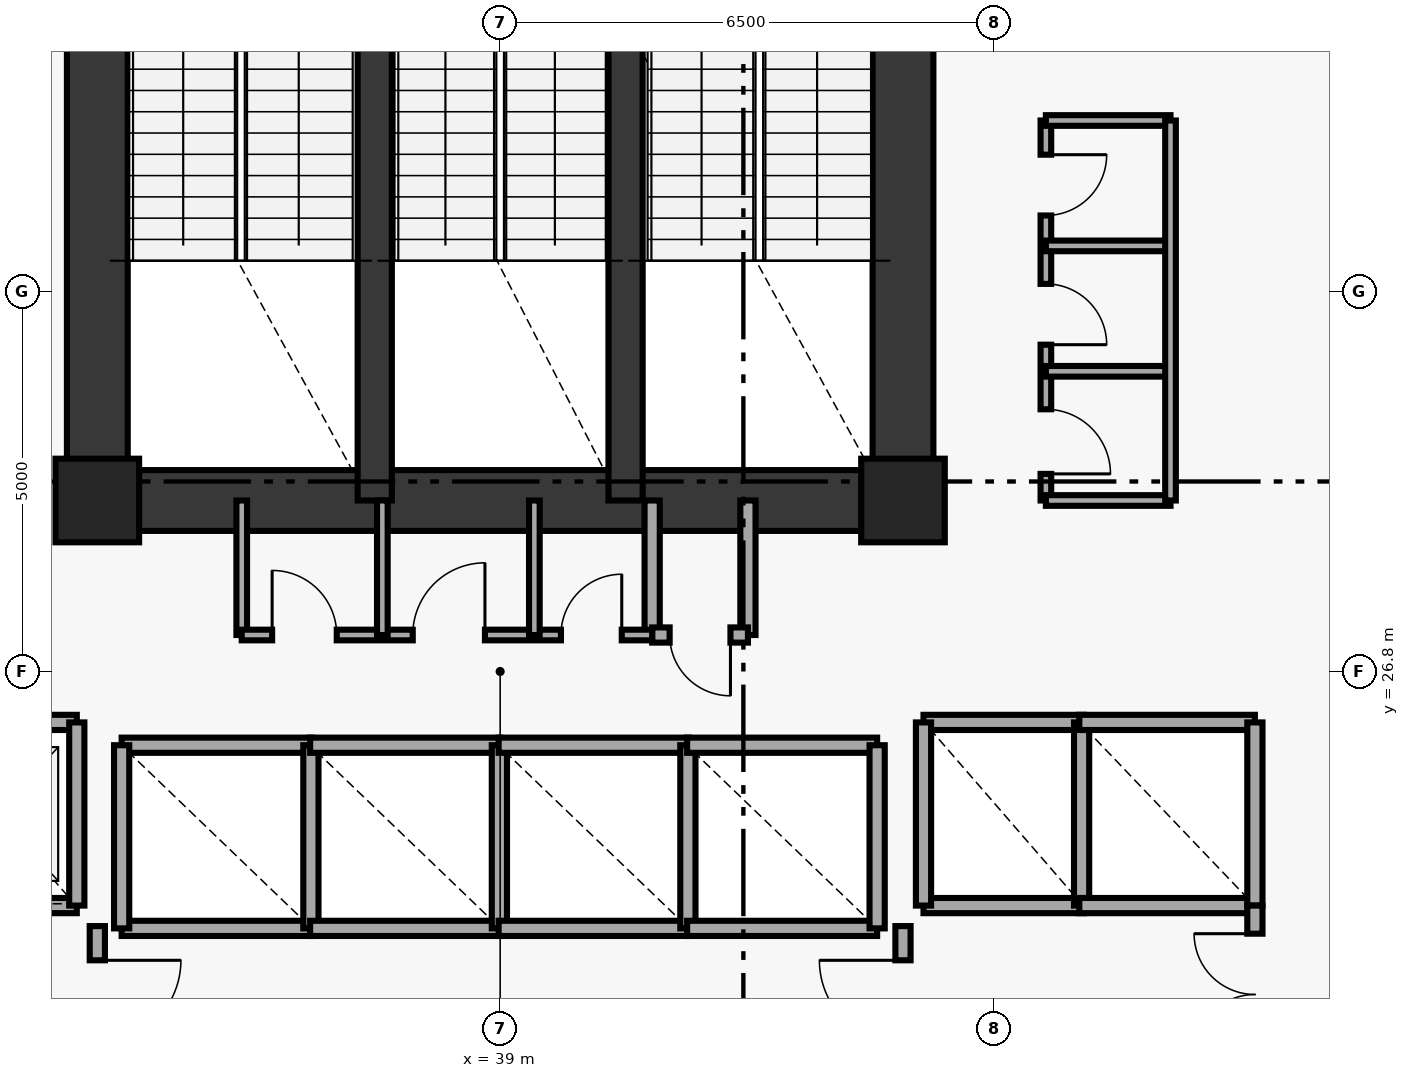
"""IFC4 building model, lengths in metres.
Left out: names, types, materials, properties, quantities, classifications, styles, units other than length and angle.
Written with IfcOpenShell. Run it as: python <this file> out.ifc"""

import sys

from ifc_helpers import new_model, si_unit, direction, frame, frame_2d, origin, origin_2d, place, context, subcontext, project, spatial, rectangle, extrude, element, fill, save


model = new_model("IFC4")
c1 = context("Model", 3, precision=1e-05, world=origin(), true_north=direction((0.0, 1.0)))
c2 = subcontext(c1, "Body", "Model", "MODEL_VIEW")
j1 = project(units=[si_unit("LENGTHUNIT", "METRE"), si_unit("PLANEANGLEUNIT", "RADIAN")], contexts=[c1])
p1 = place(None, origin())
s1 = spatial("IfcSite", under=j1, at=p1, CompositionType="ELEMENT")
p2 = place(p1, origin())
s2 = spatial("IfcBuilding", under=s1, at=p2, CompositionType="ELEMENT")
p3 = place(p2, frame((0.0, 0.0, 21.0)))
s3 = spatial("IfcBuildingStorey", under=s2, at=p3, CompositionType="ELEMENT", Elevation=21.0)
for number, where, z_axis, x_axis in (
    (1, (44.3, 29.05, 0.0), (0.0, 0.0, 1.0), (1.0, 0.0, 0.0)),
    (2, (33.7, 29.05, 0.0), (0.0, 0.0, 1.0), (1.0, 0.0, 0.0)),
):
    element("IfcColumn", number, at=place(p3, frame(where, z_axis=z_axis, x_axis=x_axis)), inside=s3, PredefinedType="PILASTER", context=c2, shape_type="SweptSolid", body=[
        extrude(rectangle(XDim=1.1, YDim=1.1, at=origin_2d()), origin(), (0.0, 0.0, 1.0), 3.79),
    ])
for number, where, z_axis, x_axis in (
    (3, (33.7, 29.05, 0.0), (0.0, 0.0, 1.0), (0.0, 1.0, 0.0)),
    (4, (44.3, 29.05, 0.0), (0.0, 0.0, 1.0), (0.0, 1.0, 0.0)),
):
    element("IfcWall", number, at=place(p3, frame(where, z_axis=z_axis, x_axis=x_axis)), inside=s3, PredefinedType="SHEAR", context=c2, shape_type="SweptSolid", body=[
        extrude(rectangle(XDim=8.35, YDim=0.8, at=frame_2d((4.175, 0.0))), origin(), (0.0, 0.0, 1.0), 3.79),
    ])
p4 = place(p3, frame((33.7, 29.05, 0.0), z_axis=(0.0, 0.0, 1.0), x_axis=(1.0, 0.0, 0.0)))
e5 = element("IfcWall", 5, at=p4, inside=s3, PredefinedType="SHEAR", context=c2, shape_type="SweptSolid", body=[
    extrude(rectangle(XDim=10.6, YDim=0.8, at=frame_2d((5.3, 0.0))), origin(), (0.0, 0.0, 1.0), 3.79),
])
for number, where, z_axis, x_axis in (
    (6, (37.35, 29.05, 0.0), (0.0, 0.0, 1.0), (0.0, 1.0, 0.0)),
    (7, (40.65, 29.05, 0.0), (0.0, 0.0, 1.0), (0.0, 1.0, 0.0)),
):
    element("IfcWall", number, at=place(p3, frame(where, z_axis=z_axis, x_axis=x_axis)), inside=s3, PredefinedType="SHEAR", context=c2, shape_type="SweptSolid", body=[
        extrude(rectangle(XDim=8.35, YDim=0.45, at=frame_2d((4.175, 0.0))), origin(), (0.0, 0.0, 1.0), 3.79),
    ])
p5 = place(p3, frame((35.6, 27.28, 0.0), z_axis=(0.0, 0.0, 1.0), x_axis=(0.0, 1.0, 0.0)))
e8 = element("IfcWall", 8, at=p5, inside=s3, PredefinedType="PARTITIONING", context=c2, shape_type="SweptSolid", body=[
    extrude(rectangle(XDim=1.77, YDim=0.14, at=frame_2d((0.885, 0.0))), origin(), (0.0, 0.0, 1.0), 3.79),
])
for number, where, z_axis, x_axis in (
    (9, (41.0, 27.28, 0.0), (0.0, 0.0, 1.0), (0.0, 1.0, 0.0)),
    (10, (42.26, 27.28, 0.0), (0.0, 0.0, 1.0), (0.0, 1.0, 0.0)),
):
    element("IfcWall", number, at=place(p3, frame(where, z_axis=z_axis, x_axis=x_axis)), inside=s3, PredefinedType="SOLIDWALL", context=c2, shape_type="SweptSolid", body=[
        extrude(rectangle(XDim=1.77, YDim=0.2, at=frame_2d((0.885, 0.0))), origin(), (0.0, 0.0, 1.0), 3.79),
    ])
p6 = place(p3, frame((41.0, 27.28, 0.0), z_axis=(0.0, 0.0, 1.0), x_axis=(1.0, 0.0, 0.0)))
e11 = element("IfcWall", 11, at=p6, inside=s3, PredefinedType="SOLIDWALL", context=c2, shape_type="SweptSolid", body=[
    extrude(rectangle(XDim=1.26, YDim=0.2, at=frame_2d((0.63, 0.0))), origin(), (0.0, 0.0, 1.0), 3.79),
])
p7 = place(p6, frame((0.23, 0.0, 0.0)))
e12 = element("IfcOpeningElement", 12, at=p7, cuts=e11, PredefinedType="OPENING", context=c2, shape_type="SweptSolid", body=[
    extrude(rectangle(XDim=0.8, YDim=2.05, at=frame_2d((0.4, 1.025))), frame((0.0, 0.11, 0.0), z_axis=(0.0, -1.0, 0.0), x_axis=(1.0, 0.0, 0.0)), (0.0, 0.0, 1.0), 0.22),
])
p8 = place(p3, frame((31.32, 23.72, 0.0), z_axis=(0.0, 0.0, 1.0), x_axis=(1.0, 0.0, 0.0)))
e13 = element("IfcWall", 13, at=p8, inside=s3, PredefinedType="SOLIDWALL", context=c2, shape_type="SweptSolid", body=[
    extrude(rectangle(XDim=2.11, YDim=0.2, at=frame_2d((1.055, 0.0))), origin(), (0.0, 0.0, 1.0), 3.79),
])
p9 = place(p8, frame((0.505, 0.0, 0.0)))
e14 = element("IfcOpeningElement", 14, at=p9, cuts=e13, PredefinedType="OPENING", context=c2, shape_type="SweptSolid", body=[
    extrude(rectangle(XDim=1.1, YDim=2.15, at=frame_2d((0.55, 1.075))), frame((0.0, 0.11, 0.0), z_axis=(0.0, -1.0, 0.0), x_axis=(1.0, 0.0, 0.0)), (0.0, 0.0, 1.0), 0.22),
])
p10 = place(p3, frame((31.32, 26.13, 0.0), z_axis=(0.0, 0.0, 1.0), x_axis=(1.0, 0.0, 0.0)))
e15 = element("IfcWall", 15, at=p10, inside=s3, PredefinedType="SOLIDWALL", context=c2, shape_type="SweptSolid", body=[
    extrude(rectangle(XDim=2.11, YDim=0.2, at=frame_2d((1.055, 0.0))), origin(), (0.0, 0.0, 1.0), 3.79),
])
p11 = place(p3, frame((33.43, 23.72, 0.0), z_axis=(0.0, 0.0, 1.0), x_axis=(0.0, 1.0, 0.0)))
e16 = element("IfcWall", 16, at=p11, inside=s3, PredefinedType="SOLIDWALL", context=c2, shape_type="SweptSolid", body=[
    extrude(rectangle(XDim=2.41, YDim=0.2, at=frame_2d((1.205, 0.0))), origin(), (0.0, 0.0, 1.0), 3.79),
])
for number, where, z_axis, x_axis in (
    (17, (44.57, 23.72, 0.0), (0.0, 0.0, 1.0), (1.0, 0.0, 0.0)),
    (18, (44.57, 26.13, 0.0), (0.0, 0.0, 1.0), (1.0, 0.0, 0.0)),
):
    element("IfcWall", number, at=place(p3, frame(where, z_axis=z_axis, x_axis=x_axis)), inside=s3, PredefinedType="SOLIDWALL", context=c2, shape_type="SweptSolid", body=[
        extrude(rectangle(XDim=2.11, YDim=0.2, at=frame_2d((1.055, 0.0))), origin(), (0.0, 0.0, 1.0), 3.79),
    ])
for number, where, z_axis, x_axis in (
    (19, (44.57, 23.72, 0.0), (0.0, 0.0, 1.0), (0.0, 1.0, 0.0)),
    (20, (46.65, 23.72, 0.0), (0.0, 0.0, 1.0), (0.0, 1.0, 0.0)),
):
    element("IfcWall", number, at=place(p3, frame(where, z_axis=z_axis, x_axis=x_axis)), inside=s3, PredefinedType="SOLIDWALL", context=c2, shape_type="SweptSolid", body=[
        extrude(rectangle(XDim=2.41, YDim=0.2, at=frame_2d((1.205, 0.0))), origin(), (0.0, 0.0, 1.0), 3.79),
    ])
for number, where, z_axis, x_axis in (
    (21, (46.62, 23.72, 0.0), (0.0, 0.0, 1.0), (1.0, 0.0, 0.0)),
    (22, (46.62, 26.13, 0.0), (0.0, 0.0, 1.0), (1.0, 0.0, 0.0)),
):
    element("IfcWall", number, at=place(p3, frame(where, z_axis=z_axis, x_axis=x_axis)), inside=s3, PredefinedType="SOLIDWALL", context=c2, shape_type="SweptSolid", body=[
        extrude(rectangle(XDim=2.31, YDim=0.2, at=frame_2d((1.155, 0.0))), origin(), (0.0, 0.0, 1.0), 3.79),
    ])
p12 = place(p3, frame((48.93, 23.72, 0.0), z_axis=(0.0, 0.0, 1.0), x_axis=(0.0, 1.0, 0.0)))
e23 = element("IfcWall", 23, at=p12, inside=s3, PredefinedType="SOLIDWALL", context=c2, shape_type="SweptSolid", body=[
    extrude(rectangle(XDim=2.41, YDim=0.2, at=frame_2d((1.205, 0.0))), origin(), (0.0, 0.0, 1.0), 3.79),
])
for number, where, z_axis, x_axis in (
    (24, (34.02, 23.42, 0.0), (0.0, 0.0, 1.0), (1.0, 0.0, 0.0)),
    (25, (34.02, 25.83, 0.0), (0.0, 0.0, 1.0), (1.0, 0.0, 0.0)),
):
    element("IfcWall", number, at=place(p3, frame(where, z_axis=z_axis, x_axis=x_axis)), inside=s3, PredefinedType="SOLIDWALL", context=c2, shape_type="SweptSolid", body=[
        extrude(rectangle(XDim=2.5, YDim=0.2, at=frame_2d((1.25, 0.0))), origin(), (0.0, 0.0, 1.0), 3.79),
    ])
for number, where, z_axis, x_axis in (
    (26, (34.02, 23.42, 0.0), (0.0, 0.0, 1.0), (0.0, 1.0, 0.0)),
    (27, (36.51, 23.42, 0.0), (0.0, 0.0, 1.0), (0.0, 1.0, 0.0)),
):
    element("IfcWall", number, at=place(p3, frame(where, z_axis=z_axis, x_axis=x_axis)), inside=s3, PredefinedType="SOLIDWALL", context=c2, shape_type="SweptSolid", body=[
        extrude(rectangle(XDim=2.41, YDim=0.2, at=frame_2d((1.205, 0.0))), origin(), (0.0, 0.0, 1.0), 3.79),
    ])
for number, where, z_axis, x_axis in (
    (28, (36.5, 23.42, 0.0), (0.0, 0.0, 1.0), (1.0, 0.0, 0.0)),
    (29, (36.5, 25.83, 0.0), (0.0, 0.0, 1.0), (1.0, 0.0, 0.0)),
):
    element("IfcWall", number, at=place(p3, frame(where, z_axis=z_axis, x_axis=x_axis)), inside=s3, PredefinedType="SOLIDWALL", context=c2, shape_type="SweptSolid", body=[
        extrude(rectangle(XDim=2.5, YDim=0.2, at=frame_2d((1.25, 0.0))), origin(), (0.0, 0.0, 1.0), 3.79),
    ])
p13 = place(p3, frame((38.99, 23.42, 0.0), z_axis=(0.0, 0.0, 1.0), x_axis=(0.0, 1.0, 0.0)))
e30 = element("IfcWall", 30, at=p13, inside=s3, PredefinedType="SOLIDWALL", context=c2, shape_type="SweptSolid", body=[
    extrude(rectangle(XDim=2.41, YDim=0.2, at=frame_2d((1.205, 0.0))), origin(), (0.0, 0.0, 1.0), 3.79),
])
for number, where, z_axis, x_axis in (
    (31, (38.98, 23.42, 0.0), (0.0, 0.0, 1.0), (1.0, 0.0, 0.0)),
    (32, (38.98, 25.83, 0.0), (0.0, 0.0, 1.0), (1.0, 0.0, 0.0)),
):
    element("IfcWall", number, at=place(p3, frame(where, z_axis=z_axis, x_axis=x_axis)), inside=s3, PredefinedType="SOLIDWALL", context=c2, shape_type="SweptSolid", body=[
        extrude(rectangle(XDim=2.5, YDim=0.2, at=frame_2d((1.25, 0.0))), origin(), (0.0, 0.0, 1.0), 3.79),
    ])
p14 = place(p3, frame((41.47, 23.42, 0.0), z_axis=(0.0, 0.0, 1.0), x_axis=(0.0, 1.0, 0.0)))
e33 = element("IfcWall", 33, at=p14, inside=s3, PredefinedType="SOLIDWALL", context=c2, shape_type="SweptSolid", body=[
    extrude(rectangle(XDim=2.41, YDim=0.2, at=frame_2d((1.205, 0.0))), origin(), (0.0, 0.0, 1.0), 3.79),
])
for number, where, z_axis, x_axis in (
    (34, (41.46, 23.42, 0.0), (0.0, 0.0, 1.0), (1.0, 0.0, 0.0)),
    (35, (41.46, 25.83, 0.0), (0.0, 0.0, 1.0), (1.0, 0.0, 0.0)),
):
    element("IfcWall", number, at=place(p3, frame(where, z_axis=z_axis, x_axis=x_axis)), inside=s3, PredefinedType="SOLIDWALL", context=c2, shape_type="SweptSolid", body=[
        extrude(rectangle(XDim=2.5, YDim=0.2, at=frame_2d((1.25, 0.0))), origin(), (0.0, 0.0, 1.0), 3.79),
    ])
p15 = place(p3, frame((43.96, 23.42, 0.0), z_axis=(0.0, 0.0, 1.0), x_axis=(0.0, 1.0, 0.0)))
e36 = element("IfcWall", 36, at=p15, inside=s3, PredefinedType="SOLIDWALL", context=c2, shape_type="SweptSolid", body=[
    extrude(rectangle(XDim=2.41, YDim=0.2, at=frame_2d((1.205, 0.0))), origin(), (0.0, 0.0, 1.0), 3.79),
])
p16 = place(p3, frame((48.93, 21.38, 0.0), z_axis=(0.0, 0.0, 1.0), x_axis=(0.0, 1.0, 0.0)))
e37 = element("IfcWall", 37, at=p16, inside=s3, PredefinedType="SOLIDWALL", context=c2, shape_type="SweptSolid", body=[
    extrude(rectangle(XDim=2.34, YDim=0.2, at=frame_2d((1.17, 0.0))), origin(), (0.0, 0.0, 1.0), 3.79),
])
p17 = place(p16, frame((0.37, 0.0, 0.0)))
e38 = element("IfcOpeningElement", 38, at=p17, cuts=e37, PredefinedType="OPENING", context=c2, shape_type="SweptSolid", body=[
    extrude(rectangle(XDim=1.6, YDim=2.2, at=frame_2d((0.8, 1.1))), frame((0.0, 0.11, 0.0), z_axis=(0.0, -1.0, 0.0), x_axis=(1.0, 0.0, 0.0)), (0.0, 0.0, 1.0), 0.22),
])
p18 = place(p3, frame((33.7, 21.35, 0.0), z_axis=(0.0, 0.0, 1.0), x_axis=(0.0, 1.0, 0.0)))
e39 = element("IfcWall", 39, at=p18, inside=s3, PredefinedType="SOLIDWALL", context=c2, shape_type="SweptSolid", body=[
    extrude(rectangle(XDim=2.1, YDim=0.2, at=frame_2d((1.05, 0.0))), origin(), (0.0, 0.0, 1.0), 3.01),
])
p19 = place(p18, frame((0.55, 0.0, 0.0)))
e40 = element("IfcOpeningElement", 40, at=p19, cuts=e39, PredefinedType="OPENING", context=c2, shape_type="SweptSolid", body=[
    extrude(rectangle(XDim=1.1, YDim=2.15, at=frame_2d((0.55, 1.075))), frame((0.0, 0.11, 0.0), z_axis=(0.0, -1.0, 0.0), x_axis=(1.0, 0.0, 0.0)), (0.0, 0.0, 1.0), 0.22),
])
p20 = place(p3, frame((44.3, 21.35, 0.0), z_axis=(0.0, 0.0, 1.0), x_axis=(0.0, 1.0, 0.0)))
e41 = element("IfcWall", 41, at=p20, inside=s3, PredefinedType="SOLIDWALL", context=c2, shape_type="SweptSolid", body=[
    extrude(rectangle(XDim=2.1, YDim=0.2, at=frame_2d((1.05, 0.0))), origin(), (0.0, 0.0, 1.0), 3.01),
])
p21 = place(p20, frame((0.55, 0.0, 0.0)))
e42 = element("IfcOpeningElement", 42, at=p21, cuts=e41, PredefinedType="OPENING", context=c2, shape_type="SweptSolid", body=[
    extrude(rectangle(XDim=1.1, YDim=2.15, at=frame_2d((0.55, 1.075))), frame((0.0, 0.11, 0.0), z_axis=(0.0, -1.0, 0.0), x_axis=(1.0, 0.0, 0.0)), (0.0, 0.0, 1.0), 0.22),
])
p22 = place(p3, frame((35.6, 27.28, 0.0), z_axis=(0.0, 0.0, 1.0), x_axis=(1.0, 0.0, 0.0)))
e43 = element("IfcWall", 43, at=p22, inside=s3, PredefinedType="PARTITIONING", context=c2, shape_type="SweptSolid", body=[
    extrude(rectangle(XDim=5.4, YDim=0.14, at=frame_2d((2.7, 0.0))), origin(), (0.0, 0.0, 1.0), 3.79),
])
p23 = place(p22, frame((0.4, 0.0, 0.0)))
e44 = element("IfcOpeningElement", 44, at=p23, cuts=e43, PredefinedType="OPENING", context=c2, shape_type="SweptSolid", body=[
    extrude(rectangle(XDim=0.85, YDim=2.1, at=frame_2d((0.425, 1.05))), frame((0.0, 0.08, 0.0), z_axis=(0.0, -1.0, 0.0), x_axis=(1.0, 0.0, 0.0)), (0.0, 0.0, 1.0), 0.16),
])
p24 = place(p22, frame((2.25, 0.0, 0.0)))
e45 = element("IfcOpeningElement", 45, at=p24, cuts=e43, PredefinedType="OPENING", context=c2, shape_type="SweptSolid", body=[
    extrude(rectangle(XDim=0.95, YDim=2.1, at=frame_2d((0.475, 1.05))), frame((0.0, 0.08, 0.0), z_axis=(0.0, -1.0, 0.0), x_axis=(1.0, 0.0, 0.0)), (0.0, 0.0, 1.0), 0.16),
])
p25 = place(p22, frame((4.2, 0.0, 0.0)))
e46 = element("IfcOpeningElement", 46, at=p25, cuts=e43, PredefinedType="OPENING", context=c2, shape_type="SweptSolid", body=[
    extrude(rectangle(XDim=0.8, YDim=2.05, at=frame_2d((0.4, 1.025))), frame((0.0, 0.08, 0.0), z_axis=(0.0, -1.0, 0.0), x_axis=(1.0, 0.0, 0.0)), (0.0, 0.0, 1.0), 0.16),
])
for number, where, z_axis, x_axis in (
    (47, (37.45, 27.28, 0.0), (0.0, 0.0, 1.0), (0.0, 1.0, 0.0)),
    (48, (39.45, 27.28, 0.0), (0.0, 0.0, 1.0), (0.0, 1.0, 0.0)),
):
    element("IfcWall", number, at=place(p3, frame(where, z_axis=z_axis, x_axis=x_axis)), inside=s3, PredefinedType="PARTITIONING", context=c2, shape_type="SweptSolid", body=[
        extrude(rectangle(XDim=1.77, YDim=0.14, at=frame_2d((0.885, 0.0))), origin(), (0.0, 0.0, 1.0), 3.79),
    ])
p26 = place(p3, frame((46.18, 34.05, 0.0), z_axis=(0.0, 0.0, 1.0), x_axis=(0.0, -1.0, 0.0)))
e49 = element("IfcWall", 49, at=p26, inside=s3, PredefinedType="PARTITIONING", context=c2, shape_type="SweptSolid", body=[
    extrude(rectangle(XDim=5.0, YDim=0.14, at=frame_2d((2.5, 0.0))), origin(), (0.0, 0.0, 1.0), 3.79),
])
p27 = place(p26, frame((3.8, 0.0, 0.0)))
e50 = element("IfcOpeningElement", 50, at=p27, cuts=e49, PredefinedType="OPENING", context=c2, shape_type="SweptSolid", body=[
    extrude(rectangle(XDim=0.85, YDim=2.1, at=frame_2d((0.425, 1.05))), frame((0.0, 0.08, 0.0), z_axis=(0.0, -1.0, 0.0), x_axis=(1.0, 0.0, 0.0)), (0.0, 0.0, 1.0), 0.16),
])
p28 = place(p26, frame((2.15, 0.0, 0.0)))
e51 = element("IfcOpeningElement", 51, at=p28, cuts=e49, PredefinedType="OPENING", context=c2, shape_type="SweptSolid", body=[
    extrude(rectangle(XDim=0.8, YDim=2.05, at=frame_2d((0.4, 1.025))), frame((0.0, 0.08, 0.0), z_axis=(0.0, -1.0, 0.0), x_axis=(1.0, 0.0, 0.0)), (0.0, 0.0, 1.0), 0.16),
])
p29 = place(p26, frame((0.45, 0.0, 0.0)))
e52 = element("IfcOpeningElement", 52, at=p29, cuts=e49, PredefinedType="OPENING", context=c2, shape_type="SweptSolid", body=[
    extrude(rectangle(XDim=0.8, YDim=2.05, at=frame_2d((0.4, 1.025))), frame((0.0, 0.08, 0.0), z_axis=(0.0, -1.0, 0.0), x_axis=(1.0, 0.0, 0.0)), (0.0, 0.0, 1.0), 0.16),
])
for number, where, z_axis, x_axis in (
    (53, (46.18, 29.05, 0.0), (0.0, 0.0, 1.0), (1.0, 0.0, 0.0)),
    (54, (46.18, 30.75, 0.0), (0.0, 0.0, 1.0), (1.0, 0.0, 0.0)),
    (55, (46.18, 32.4, 0.0), (0.0, 0.0, 1.0), (1.0, 0.0, 0.0)),
    (56, (46.18, 34.05, 0.0), (0.0, 0.0, 1.0), (1.0, 0.0, 0.0)),
):
    element("IfcWall", number, at=place(p3, frame(where, z_axis=z_axis, x_axis=x_axis)), inside=s3, PredefinedType="PARTITIONING", context=c2, shape_type="SweptSolid", body=[
        extrude(rectangle(XDim=1.64, YDim=0.14, at=frame_2d((0.82, 0.0))), origin(), (0.0, 0.0, 1.0), 3.79),
    ])
p30 = place(p3, frame((47.82, 29.05, 0.0), z_axis=(0.0, 0.0, 1.0), x_axis=(0.0, 1.0, 0.0)))
e57 = element("IfcWall", 57, at=p30, inside=s3, PredefinedType="PARTITIONING", context=c2, shape_type="SweptSolid", body=[
    extrude(rectangle(XDim=5.0, YDim=0.14, at=frame_2d((2.5, 0.0))), origin(), (0.0, 0.0, 1.0), 3.79),
])
p31 = place(p3, frame((51.812, 30.822, 0.0), z_axis=(0.0, 0.0, 1.0), x_axis=(-0.312751602659, 0.94983495147, 0.0)))
e58 = element("IfcWall", 58, at=p31, inside=s3, PredefinedType="PARTITIONING", context=c2, shape_type="SweptSolid", body=[
    extrude(rectangle(XDim=8.349, YDim=0.16, at=frame_2d((4.174, 0.0))), origin(), (0.0, 0.0, 1.0), 3.79),
])
p32 = place(p7, origin())
e59 = element("IfcDoor", 59, at=p32, inside=s3, OperationType="SINGLE_SWING_RIGHT", PredefinedType="DOOR", context=c2, shape_type="SweptSolid", body=[
    extrude(rectangle(XDim=0.8, YDim=2.05, at=frame_2d((0.4, 1.025))), frame((0.0, 0.025, 0.0), z_axis=(0.0, -1.0, 0.0), x_axis=(1.0, 0.0, 0.0)), (0.0, 0.0, 1.0), 0.05),
])
fill(e12, e59)
p33 = place(p17, origin())
e60 = element("IfcDoor", 60, at=p33, inside=s3, OperationType="DOUBLE_DOOR_SINGLE_SWING", PredefinedType="DOOR", context=c2, shape_type="SweptSolid", body=[
    extrude(rectangle(XDim=1.6, YDim=2.2, at=frame_2d((0.8, 1.1))), frame((0.0, 0.025, 0.0), z_axis=(0.0, -1.0, 0.0), x_axis=(1.0, 0.0, 0.0)), (0.0, 0.0, 1.0), 0.05),
])
fill(e38, e60)
p34 = place(p19, origin())
e61 = element("IfcDoor", 61, at=p34, inside=s3, OperationType="SINGLE_SWING_RIGHT", PredefinedType="DOOR", context=c2, shape_type="SweptSolid", body=[
    extrude(rectangle(XDim=1.1, YDim=2.15, at=frame_2d((0.55, 1.075))), frame((0.0, 0.025, 0.0), z_axis=(0.0, -1.0, 0.0), x_axis=(1.0, 0.0, 0.0)), (0.0, 0.0, 1.0), 0.05),
])
fill(e40, e61)
p35 = place(p21, origin())
e62 = element("IfcDoor", 62, at=p35, inside=s3, OperationType="SINGLE_SWING_RIGHT", PredefinedType="DOOR", context=c2, shape_type="SweptSolid", body=[
    extrude(rectangle(XDim=1.1, YDim=2.15, at=frame_2d((0.55, 1.075))), frame((0.0, 0.025, 0.0), z_axis=(0.0, -1.0, 0.0), x_axis=(1.0, 0.0, 0.0)), (0.0, 0.0, 1.0), 0.05),
])
fill(e42, e62)
p36 = place(p23, origin())
e63 = element("IfcDoor", 63, at=p36, inside=s3, OperationType="SINGLE_SWING_LEFT", PredefinedType="DOOR", context=c2, shape_type="SweptSolid", body=[
    extrude(rectangle(XDim=0.85, YDim=2.1, at=frame_2d((0.425, 1.05))), frame((0.0, 0.025, 0.0), z_axis=(0.0, -1.0, 0.0), x_axis=(1.0, 0.0, 0.0)), (0.0, 0.0, 1.0), 0.05),
])
fill(e44, e63)
p37 = place(p24, origin())
e64 = element("IfcDoor", 64, at=p37, inside=s3, OperationType="SINGLE_SWING_RIGHT", PredefinedType="DOOR", context=c2, shape_type="SweptSolid", body=[
    extrude(rectangle(XDim=0.95, YDim=2.1, at=frame_2d((0.475, 1.05))), frame((0.0, 0.025, 0.0), z_axis=(0.0, -1.0, 0.0), x_axis=(1.0, 0.0, 0.0)), (0.0, 0.0, 1.0), 0.05),
])
fill(e45, e64)
p38 = place(p25, origin())
e65 = element("IfcDoor", 65, at=p38, inside=s3, OperationType="SINGLE_SWING_RIGHT", PredefinedType="DOOR", context=c2, shape_type="SweptSolid", body=[
    extrude(rectangle(XDim=0.8, YDim=2.05, at=frame_2d((0.4, 1.025))), frame((0.0, 0.025, 0.0), z_axis=(0.0, -1.0, 0.0), x_axis=(1.0, 0.0, 0.0)), (0.0, 0.0, 1.0), 0.05),
])
fill(e46, e65)
p39 = place(p27, origin())
e66 = element("IfcDoor", 66, at=p39, inside=s3, OperationType="SINGLE_SWING_RIGHT", PredefinedType="DOOR", context=c2, shape_type="SweptSolid", body=[
    extrude(rectangle(XDim=0.85, YDim=2.1, at=frame_2d((0.425, 1.05))), frame((0.0, 0.025, 0.0), z_axis=(0.0, -1.0, 0.0), x_axis=(1.0, 0.0, 0.0)), (0.0, 0.0, 1.0), 0.05),
])
fill(e50, e66)
p40 = place(p28, origin())
e67 = element("IfcDoor", 67, at=p40, inside=s3, OperationType="SINGLE_SWING_RIGHT", PredefinedType="DOOR", context=c2, shape_type="SweptSolid", body=[
    extrude(rectangle(XDim=0.8, YDim=2.05, at=frame_2d((0.4, 1.025))), frame((0.0, 0.025, 0.0), z_axis=(0.0, -1.0, 0.0), x_axis=(1.0, 0.0, 0.0)), (0.0, 0.0, 1.0), 0.05),
])
fill(e51, e67)
p41 = place(p29, origin())
e68 = element("IfcDoor", 68, at=p41, inside=s3, OperationType="SINGLE_SWING_LEFT", PredefinedType="DOOR", context=c2, shape_type="SweptSolid", body=[
    extrude(rectangle(XDim=0.8, YDim=2.05, at=frame_2d((0.4, 1.025))), frame((0.0, 0.025, 0.0), z_axis=(0.0, -1.0, 0.0), x_axis=(1.0, 0.0, 0.0)), (0.0, 0.0, 1.0), 0.05),
])
fill(e52, e68)
save(model, sys.argv[1])
